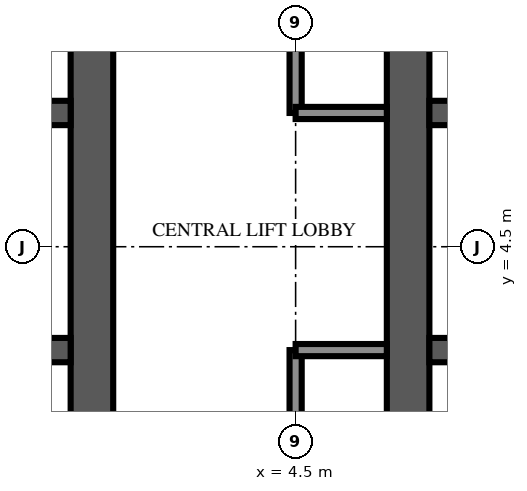
"""IFC4 building model, lengths in metres.
Left out: names, types, materials, properties, quantities, classifications, styles, units other than length and angle.
Written with IfcOpenShell. Run it as: python <this file> out.ifc"""

import sys

from ifc_helpers import new_model, si_unit, direction, frame, frame_2d, origin, place, context, subcontext, project, spatial, rectangle, extrude, element, fill, save


model = new_model("IFC4")
c1 = context("Model", 3, precision=1e-05, world=origin(), true_north=direction((0.0, 1.0)))
c2 = subcontext(c1, "Body", "Model", "MODEL_VIEW")
j1 = project(units=[si_unit("LENGTHUNIT", "METRE"), si_unit("PLANEANGLEUNIT", "RADIAN")], contexts=[c1])
p1 = place(None, origin())
s1 = spatial("IfcSite", under=j1, at=p1, CompositionType="ELEMENT")
p2 = place(p1, origin())
s2 = spatial("IfcBuilding", under=s1, at=p2, CompositionType="ELEMENT")
p3 = place(p2, frame((0.0, 0.0, 295.0)))
s3 = spatial("IfcBuildingStorey", under=s2, at=p3, CompositionType="ELEMENT", Elevation=295.0)
p4 = place(p3, frame((1.15, -9.0, 0.0), z_axis=(0.0, 0.0, 1.0), x_axis=(0.0, 1.0, 0.0)))
e1 = element("IfcWall", 1, at=p4, inside=s3, PredefinedType="SHEAR", context=c2, shape_type="SweptSolid", body=[
    extrude(rectangle(XDim=27.5, YDim=0.7, at=frame_2d((13.75, 0.0))), origin(), (0.0, 0.0, 1.0), 6.0),
])
p5 = place(p4, frame((12.55, 0.0, 0.0)))
e2 = element("IfcOpeningElement", 2, at=p5, cuts=e1, PredefinedType="OPENING", context=c2, shape_type="SweptSolid", body=[
    extrude(rectangle(XDim=2.4, YDim=2.4, at=frame_2d((1.2, 1.2))), frame((0.0, 0.36, 0.0), z_axis=(0.0, -1.0, 0.0), x_axis=(1.0, 0.0, 0.0)), (0.0, 0.0, 1.0), 0.72),
])
p6 = place(p4, frame((5.46, 0.0, 0.0)))
e3 = element("IfcOpeningElement", 3, at=p6, cuts=e1, PredefinedType="OPENING", context=c2, shape_type="SweptSolid", body=[
    extrude(rectangle(XDim=0.968, YDim=2.1, at=frame_2d((0.484, 1.05))), frame((0.0, 0.36, 0.0), z_axis=(0.0, -1.0, 0.0), x_axis=(1.0, 0.0, 0.0)), (0.0, 0.0, 1.0), 0.72),
])
p7 = place(p4, frame((23.54, 0.0, 0.0)))
e4 = element("IfcOpeningElement", 4, at=p7, cuts=e1, PredefinedType="OPENING", context=c2, shape_type="SweptSolid", body=[
    extrude(rectangle(XDim=1.2, YDim=2.1, at=frame_2d((0.6, 1.05))), frame((0.0, 0.36, 0.0), z_axis=(0.0, -1.0, 0.0), x_axis=(1.0, 0.0, 0.0)), (0.0, 0.0, 1.0), 0.72),
])
p8 = place(p3, frame((-9.8, 2.8, 0.0), z_axis=(0.0, 0.0, 1.0), x_axis=(1.0, 0.0, 0.0)))
e5 = element("IfcWall", 5, at=p8, inside=s3, PredefinedType="SHEAR", context=c2, shape_type="SweptSolid", body=[
    extrude(rectangle(XDim=10.6, YDim=0.4, at=frame_2d((5.3, 0.0))), origin(), (0.0, 0.0, 1.0), 6.0),
])
p9 = place(p8, frame((0.688, 0.0, 0.0)))
e6 = element("IfcOpeningElement", 6, at=p9, cuts=e5, PredefinedType="OPENING", context=c2, shape_type="SweptSolid", body=[
    extrude(rectangle(XDim=1.1, YDim=2.1, at=frame_2d((0.55, 1.05))), frame((0.0, 0.21, 0.0), z_axis=(0.0, -1.0, 0.0), x_axis=(1.0, 0.0, 0.0)), (0.0, 0.0, 1.0), 0.42),
])
p10 = place(p8, frame((3.438, 0.0, 0.0)))
e7 = element("IfcOpeningElement", 7, at=p10, cuts=e5, PredefinedType="OPENING", context=c2, shape_type="SweptSolid", body=[
    extrude(rectangle(XDim=1.1, YDim=2.1, at=frame_2d((0.55, 1.05))), frame((0.0, 0.21, 0.0), z_axis=(0.0, -1.0, 0.0), x_axis=(1.0, 0.0, 0.0)), (0.0, 0.0, 1.0), 0.42),
])
p11 = place(p8, frame((6.113, 0.0, 0.0)))
e8 = element("IfcOpeningElement", 8, at=p11, cuts=e5, PredefinedType="OPENING", context=c2, shape_type="SweptSolid", body=[
    extrude(rectangle(XDim=1.0, YDim=2.1, at=frame_2d((0.5, 1.05))), frame((0.0, 0.21, 0.0), z_axis=(0.0, -1.0, 0.0), x_axis=(1.0, 0.0, 0.0)), (0.0, 0.0, 1.0), 0.42),
])
p12 = place(p8, frame((8.863, 0.0, 0.0)))
e9 = element("IfcOpeningElement", 9, at=p12, cuts=e5, PredefinedType="OPENING", context=c2, shape_type="SweptSolid", body=[
    extrude(rectangle(XDim=1.0, YDim=2.1, at=frame_2d((0.5, 1.05))), frame((0.0, 0.21, 0.0), z_axis=(0.0, -1.0, 0.0), x_axis=(1.0, 0.0, 0.0)), (0.0, 0.0, 1.0), 0.42),
])
p13 = place(p3, frame((-9.8, 6.7, 0.0), z_axis=(0.0, 0.0, 1.0), x_axis=(1.0, 0.0, 0.0)))
e10 = element("IfcWall", 10, at=p13, inside=s3, PredefinedType="SHEAR", context=c2, shape_type="SweptSolid", body=[
    extrude(rectangle(XDim=10.6, YDim=0.4, at=frame_2d((5.3, 0.0))), origin(), (0.0, 0.0, 1.0), 6.0),
])
p14 = place(p13, frame((3.438, 0.0, 0.0)))
e11 = element("IfcOpeningElement", 11, at=p14, cuts=e10, PredefinedType="OPENING", context=c2, shape_type="SweptSolid", body=[
    extrude(rectangle(XDim=1.1, YDim=2.1, at=frame_2d((0.55, 1.05))), frame((0.0, 0.21, 0.0), z_axis=(0.0, -1.0, 0.0), x_axis=(1.0, 0.0, 0.0)), (0.0, 0.0, 1.0), 0.42),
])
p15 = place(p13, frame((6.062, 0.0, 0.0)))
e12 = element("IfcOpeningElement", 12, at=p15, cuts=e10, PredefinedType="OPENING", context=c2, shape_type="SweptSolid", body=[
    extrude(rectangle(XDim=1.1, YDim=2.1, at=frame_2d((0.55, 1.05))), frame((0.0, 0.21, 0.0), z_axis=(0.0, -1.0, 0.0), x_axis=(1.0, 0.0, 0.0)), (0.0, 0.0, 1.0), 0.42),
])
p16 = place(p13, frame((8.812, 0.0, 0.0)))
e13 = element("IfcOpeningElement", 13, at=p16, cuts=e10, PredefinedType="OPENING", context=c2, shape_type="SweptSolid", body=[
    extrude(rectangle(XDim=1.1, YDim=2.1, at=frame_2d((0.55, 1.05))), frame((0.0, 0.21, 0.0), z_axis=(0.0, -1.0, 0.0), x_axis=(1.0, 0.0, 0.0)), (0.0, 0.0, 1.0), 0.42),
])
p17 = place(p13, frame((0.738, 0.0, 0.0)))
e14 = element("IfcOpeningElement", 14, at=p17, cuts=e10, PredefinedType="OPENING", context=c2, shape_type="SweptSolid", body=[
    extrude(rectangle(XDim=1.0, YDim=2.1, at=frame_2d((0.5, 1.05))), frame((0.0, 0.21, 0.0), z_axis=(0.0, -1.0, 0.0), x_axis=(1.0, 0.0, 0.0)), (0.0, 0.0, 1.0), 0.42),
])
p18 = place(p3, frame((6.35, -9.0, 0.0), z_axis=(0.0, 0.0, 1.0), x_axis=(0.0, 1.0, 0.0)))
e15 = element("IfcWall", 15, at=p18, inside=s3, PredefinedType="SHEAR", context=c2, shape_type="SweptSolid", body=[
    extrude(rectangle(XDim=27.5, YDim=0.7, at=frame_2d((13.75, 0.0))), origin(), (0.0, 0.0, 1.0), 6.0),
])
p19 = place(p18, frame((12.55, 0.0, 0.0)))
e16 = element("IfcOpeningElement", 16, at=p19, cuts=e15, PredefinedType="OPENING", context=c2, shape_type="SweptSolid", body=[
    extrude(rectangle(XDim=2.4, YDim=2.4, at=frame_2d((1.2, 1.2))), frame((0.0, 0.36, 0.0), z_axis=(0.0, -1.0, 0.0), x_axis=(1.0, 0.0, 0.0)), (0.0, 0.0, 1.0), 0.72),
])
p20 = place(p18, frame((5.46, 0.0, 0.0)))
e17 = element("IfcOpeningElement", 17, at=p20, cuts=e15, PredefinedType="OPENING", context=c2, shape_type="SweptSolid", body=[
    extrude(rectangle(XDim=0.968, YDim=2.1, at=frame_2d((0.484, 1.05))), frame((0.0, 0.36, 0.0), z_axis=(0.0, -1.0, 0.0), x_axis=(1.0, 0.0, 0.0)), (0.0, 0.0, 1.0), 0.72),
])
p21 = place(p18, frame((23.54, 0.0, 0.0)))
e18 = element("IfcOpeningElement", 18, at=p21, cuts=e15, PredefinedType="OPENING", context=c2, shape_type="SweptSolid", body=[
    extrude(rectangle(XDim=1.2, YDim=2.1, at=frame_2d((0.6, 1.05))), frame((0.0, 0.36, 0.0), z_axis=(0.0, -1.0, 0.0), x_axis=(1.0, 0.0, 0.0)), (0.0, 0.0, 1.0), 0.72),
])
p22 = place(p3, frame((6.7, 2.8, 0.0), z_axis=(0.0, 0.0, 1.0), x_axis=(1.0, 0.0, 0.0)))
e19 = element("IfcWall", 19, at=p22, inside=s3, PredefinedType="SHEAR", context=c2, shape_type="SweptSolid", body=[
    extrude(rectangle(XDim=10.6, YDim=0.4, at=frame_2d((5.3, 0.0))), origin(), (0.0, 0.0, 1.0), 6.0),
])
p23 = place(p22, frame((0.688, 0.0, 0.0)))
e20 = element("IfcOpeningElement", 20, at=p23, cuts=e19, PredefinedType="OPENING", context=c2, shape_type="SweptSolid", body=[
    extrude(rectangle(XDim=1.1, YDim=2.1, at=frame_2d((0.55, 1.05))), frame((0.0, 0.21, 0.0), z_axis=(0.0, -1.0, 0.0), x_axis=(1.0, 0.0, 0.0)), (0.0, 0.0, 1.0), 0.42),
])
p24 = place(p22, frame((3.438, 0.0, 0.0)))
e21 = element("IfcOpeningElement", 21, at=p24, cuts=e19, PredefinedType="OPENING", context=c2, shape_type="SweptSolid", body=[
    extrude(rectangle(XDim=1.1, YDim=2.1, at=frame_2d((0.55, 1.05))), frame((0.0, 0.21, 0.0), z_axis=(0.0, -1.0, 0.0), x_axis=(1.0, 0.0, 0.0)), (0.0, 0.0, 1.0), 0.42),
])
p25 = place(p22, frame((6.113, 0.0, 0.0)))
e22 = element("IfcOpeningElement", 22, at=p25, cuts=e19, PredefinedType="OPENING", context=c2, shape_type="SweptSolid", body=[
    extrude(rectangle(XDim=1.0, YDim=2.1, at=frame_2d((0.5, 1.05))), frame((0.0, 0.21, 0.0), z_axis=(0.0, -1.0, 0.0), x_axis=(1.0, 0.0, 0.0)), (0.0, 0.0, 1.0), 0.42),
])
p26 = place(p22, frame((8.863, 0.0, 0.0)))
e23 = element("IfcOpeningElement", 23, at=p26, cuts=e19, PredefinedType="OPENING", context=c2, shape_type="SweptSolid", body=[
    extrude(rectangle(XDim=1.0, YDim=2.1, at=frame_2d((0.5, 1.05))), frame((0.0, 0.21, 0.0), z_axis=(0.0, -1.0, 0.0), x_axis=(1.0, 0.0, 0.0)), (0.0, 0.0, 1.0), 0.42),
])
p27 = place(p3, frame((6.7, 6.7, 0.0), z_axis=(0.0, 0.0, 1.0), x_axis=(1.0, 0.0, 0.0)))
e24 = element("IfcWall", 24, at=p27, inside=s3, PredefinedType="SHEAR", context=c2, shape_type="SweptSolid", body=[
    extrude(rectangle(XDim=10.6, YDim=0.4, at=frame_2d((5.3, 0.0))), origin(), (0.0, 0.0, 1.0), 6.0),
])
p28 = place(p27, frame((3.438, 0.0, 0.0)))
e25 = element("IfcOpeningElement", 25, at=p28, cuts=e24, PredefinedType="OPENING", context=c2, shape_type="SweptSolid", body=[
    extrude(rectangle(XDim=1.1, YDim=2.1, at=frame_2d((0.55, 1.05))), frame((0.0, 0.21, 0.0), z_axis=(0.0, -1.0, 0.0), x_axis=(1.0, 0.0, 0.0)), (0.0, 0.0, 1.0), 0.42),
])
p29 = place(p27, frame((6.062, 0.0, 0.0)))
e26 = element("IfcOpeningElement", 26, at=p29, cuts=e24, PredefinedType="OPENING", context=c2, shape_type="SweptSolid", body=[
    extrude(rectangle(XDim=1.1, YDim=2.1, at=frame_2d((0.55, 1.05))), frame((0.0, 0.21, 0.0), z_axis=(0.0, -1.0, 0.0), x_axis=(1.0, 0.0, 0.0)), (0.0, 0.0, 1.0), 0.42),
])
p30 = place(p27, frame((8.812, 0.0, 0.0)))
e27 = element("IfcOpeningElement", 27, at=p30, cuts=e24, PredefinedType="OPENING", context=c2, shape_type="SweptSolid", body=[
    extrude(rectangle(XDim=1.1, YDim=2.1, at=frame_2d((0.55, 1.05))), frame((0.0, 0.21, 0.0), z_axis=(0.0, -1.0, 0.0), x_axis=(1.0, 0.0, 0.0)), (0.0, 0.0, 1.0), 0.42),
])
p31 = place(p27, frame((0.738, 0.0, 0.0)))
e28 = element("IfcOpeningElement", 28, at=p31, cuts=e24, PredefinedType="OPENING", context=c2, shape_type="SweptSolid", body=[
    extrude(rectangle(XDim=1.0, YDim=2.1, at=frame_2d((0.5, 1.05))), frame((0.0, 0.21, 0.0), z_axis=(0.0, -1.0, 0.0), x_axis=(1.0, 0.0, 0.0)), (0.0, 0.0, 1.0), 0.42),
])
p32 = place(p3, frame((4.5, 2.8, 0.0), z_axis=(0.0, 0.0, 1.0), x_axis=(0.0, -1.0, 0.0)))
e29 = element("IfcWall", 29, at=p32, inside=s3, PredefinedType="PARTITIONING", context=c2, shape_type="SweptSolid", body=[
    extrude(rectangle(XDim=4.8, YDim=0.2, at=frame_2d((2.4, 0.0))), origin(), (0.0, 0.0, 1.0), 5.4),
])
p33 = place(p32, frame((1.2, 0.0, 0.0)))
e30 = element("IfcOpeningElement", 30, at=p33, cuts=e29, PredefinedType="OPENING", context=c2, shape_type="SweptSolid", body=[
    extrude(rectangle(XDim=1.0, YDim=2.1, at=frame_2d((0.5, 1.05))), frame((0.0, 0.11, 0.0), z_axis=(0.0, -1.0, 0.0), x_axis=(1.0, 0.0, 0.0)), (0.0, 0.0, 1.0), 0.22),
])
p34 = place(p3, frame((4.5, 18.5, 0.0), z_axis=(0.0, 0.0, 1.0), x_axis=(0.0, -1.0, 0.0)))
e31 = element("IfcWall", 31, at=p34, inside=s3, PredefinedType="PARTITIONING", context=c2, shape_type="SweptSolid", body=[
    extrude(rectangle(XDim=11.8, YDim=0.2, at=frame_2d((5.9, 0.0))), origin(), (0.0, 0.0, 1.0), 5.4),
])
p35 = place(p34, frame((4.7, 0.0, 0.0)))
e32 = element("IfcOpeningElement", 32, at=p35, cuts=e31, PredefinedType="OPENING", context=c2, shape_type="SweptSolid", body=[
    extrude(rectangle(XDim=1.0, YDim=2.1, at=frame_2d((0.5, 1.05))), frame((0.0, 0.11, 0.0), z_axis=(0.0, -1.0, 0.0), x_axis=(1.0, 0.0, 0.0)), (0.0, 0.0, 1.0), 0.22),
])
for number, where, z_axis, x_axis in (
    (33, (4.5, 2.8, 0.0), (0.0, 0.0, 1.0), (1.0, 0.0, 0.0)),
    (34, (4.5, 6.7, 0.0), (0.0, 0.0, 1.0), (1.0, 0.0, 0.0)),
):
    element("IfcWall", number, at=place(p3, frame(where, z_axis=z_axis, x_axis=x_axis)), inside=s3, PredefinedType="PARTITIONING", context=c2, shape_type="SweptSolid", body=[
        extrude(rectangle(XDim=1.5, YDim=0.2, at=frame_2d((0.75, 0.0))), origin(), (0.0, 0.0, 1.0), 5.4),
    ])
p36 = place(p5, origin())
e35 = element("IfcDoor", 35, at=p36, inside=s3, OperationType="DOUBLE_DOOR_DOUBLE_SWING", PredefinedType="DOOR", context=c2, shape_type="SweptSolid", body=[
    extrude(rectangle(XDim=2.4, YDim=2.4, at=frame_2d((1.2, 1.2))), frame((0.0, 0.025, 0.0), z_axis=(0.0, -1.0, 0.0), x_axis=(1.0, 0.0, 0.0)), (0.0, 0.0, 1.0), 0.05),
])
fill(e2, e35)
p37 = place(p19, origin())
e36 = element("IfcDoor", 36, at=p37, inside=s3, OperationType="DOUBLE_DOOR_DOUBLE_SWING", PredefinedType="DOOR", context=c2, shape_type="SweptSolid", body=[
    extrude(rectangle(XDim=2.4, YDim=2.4, at=frame_2d((1.2, 1.2))), frame((0.0, 0.025, 0.0), z_axis=(0.0, -1.0, 0.0), x_axis=(1.0, 0.0, 0.0)), (0.0, 0.0, 1.0), 0.05),
])
fill(e16, e36)
save(model, sys.argv[1])
